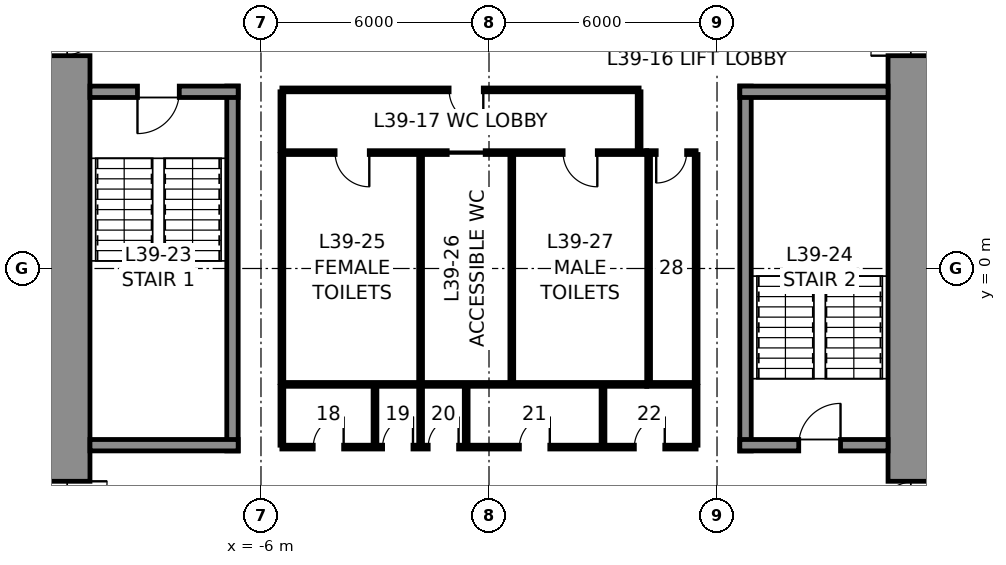
"""IFC4 building model, lengths in metres.
Left out: names, types, materials, properties, quantities, classifications, styles, units other than length and angle.
Written with IfcOpenShell. Run it as: python <this file> out.ifc"""

import sys

from ifc_helpers import new_model, si_unit, direction, frame, frame_2d, origin, place, context, subcontext, project, spatial, rectangle, extrude, element, fill, save


model = new_model("IFC4")
c1 = context("Model", 3, precision=1e-05, world=origin(), true_north=direction((0.0, 1.0)))
c2 = subcontext(c1, "Body", "Model", "MODEL_VIEW")
j1 = project(units=[si_unit("LENGTHUNIT", "METRE"), si_unit("PLANEANGLEUNIT", "RADIAN")], contexts=[c1])
p1 = place(None, origin())
s1 = spatial("IfcSite", under=j1, at=p1, CompositionType="ELEMENT")
p2 = place(p1, origin())
s2 = spatial("IfcBuilding", under=s1, at=p2, CompositionType="ELEMENT")
p3 = place(p2, frame((0.0, 0.0, 183.8)))
s3 = spatial("IfcBuildingStorey", under=s2, at=p3, CompositionType="ELEMENT", Elevation=183.8)
p4 = place(p3, frame((11.25, 10.5, 0.0), z_axis=(0.0, 0.0, 1.0), x_axis=(0.0, -1.0, 0.0)))
e1 = element("IfcWall", 1, at=p4, inside=s3, PredefinedType="SHEAR", context=c2, shape_type="SweptSolid", body=[
    extrude(rectangle(XDim=21.0, YDim=1.5, at=frame_2d((10.5, 0.0))), origin(), (0.0, 0.0, 1.0), 4.0),
])
p5 = place(p4, frame((3.7, 0.0, 0.0)))
e2 = element("IfcOpeningElement", 2, at=p5, cuts=e1, PredefinedType="OPENING", context=c2, shape_type="SweptSolid", body=[
    extrude(rectangle(XDim=1.2, YDim=2.3, at=frame_2d((0.6, 1.15))), frame((0.0, 0.76, 0.0), z_axis=(0.0, -1.0, 0.0), x_axis=(1.0, 0.0, 0.0)), (0.0, 0.0, 1.0), 1.52),
])
p6 = place(p4, frame((16.1, 0.0, 0.0)))
e3 = element("IfcOpeningElement", 3, at=p6, cuts=e1, PredefinedType="OPENING", context=c2, shape_type="SweptSolid", body=[
    extrude(rectangle(XDim=1.2, YDim=2.3, at=frame_2d((0.6, 1.15))), frame((0.0, 0.76, 0.0), z_axis=(0.0, -1.0, 0.0), x_axis=(1.0, 0.0, 0.0)), (0.0, 0.0, 1.0), 1.52),
])
p7 = place(p3, frame((-11.25, -10.5, 0.0), z_axis=(0.0, 0.0, 1.0), x_axis=(0.0, 1.0, 0.0)))
e4 = element("IfcWall", 4, at=p7, inside=s3, PredefinedType="SHEAR", context=c2, shape_type="SweptSolid", body=[
    extrude(rectangle(XDim=21.0, YDim=1.5, at=frame_2d((10.5, 0.0))), origin(), (0.0, 0.0, 1.0), 4.0),
])
p8 = place(p7, frame((16.1, 0.0, 0.0)))
e5 = element("IfcOpeningElement", 5, at=p8, cuts=e4, PredefinedType="OPENING", context=c2, shape_type="SweptSolid", body=[
    extrude(rectangle(XDim=1.2, YDim=2.3, at=frame_2d((0.6, 1.15))), frame((0.0, 0.76, 0.0), z_axis=(0.0, -1.0, 0.0), x_axis=(1.0, 0.0, 0.0)), (0.0, 0.0, 1.0), 1.52),
])
p9 = place(p7, frame((3.7, 0.0, 0.0)))
e6 = element("IfcOpeningElement", 6, at=p9, cuts=e4, PredefinedType="OPENING", context=c2, shape_type="SweptSolid", body=[
    extrude(rectangle(XDim=1.2, YDim=2.3, at=frame_2d((0.6, 1.15))), frame((0.0, 0.76, 0.0), z_axis=(0.0, -1.0, 0.0), x_axis=(1.0, 0.0, 0.0)), (0.0, 0.0, 1.0), 1.52),
])
p10 = place(p3, frame((-6.75, -4.8, 0.0), z_axis=(0.0, 0.0, 1.0), x_axis=(0.0, 1.0, 0.0)))
e7 = element("IfcWall", 7, at=p10, inside=s3, PredefinedType="SOLIDWALL", context=c2, shape_type="SweptSolid", body=[
    extrude(rectangle(XDim=9.6, YDim=0.3, at=frame_2d((4.8, 0.0))), origin(), (0.0, 0.0, 1.0), 3.75),
])
p11 = place(p3, frame((-10.5, 4.65, 0.0), z_axis=(0.0, 0.0, 1.0), x_axis=(1.0, 0.0, 0.0)))
e8 = element("IfcWall", 8, at=p11, inside=s3, PredefinedType="SOLIDWALL", context=c2, shape_type="SweptSolid", body=[
    extrude(rectangle(XDim=3.9, YDim=0.3, at=frame_2d((1.95, 0.0))), origin(), (0.0, 0.0, 1.0), 3.75),
])
p12 = place(p11, frame((1.25, 0.0, 0.0)))
e9 = element("IfcOpeningElement", 9, at=p12, cuts=e8, PredefinedType="OPENING", context=c2, shape_type="SweptSolid", body=[
    extrude(rectangle(XDim=1.1, YDim=2.3, at=frame_2d((0.55, 1.15))), frame((0.0, 0.16, 0.0), z_axis=(0.0, -1.0, 0.0), x_axis=(1.0, 0.0, 0.0)), (0.0, 0.0, 1.0), 0.32),
])
p13 = place(p3, frame((-6.6, -4.65, 0.0), z_axis=(0.0, 0.0, 1.0), x_axis=(-1.0, 0.0, 0.0)))
e10 = element("IfcWall", 10, at=p13, inside=s3, PredefinedType="SOLIDWALL", context=c2, shape_type="SweptSolid", body=[
    extrude(rectangle(XDim=3.9, YDim=0.3, at=frame_2d((1.95, 0.0))), origin(), (0.0, 0.0, 1.0), 3.75),
])
p14 = place(p3, frame((6.75, -4.8, 0.0), z_axis=(0.0, 0.0, 1.0), x_axis=(0.0, 1.0, 0.0)))
e11 = element("IfcWall", 11, at=p14, inside=s3, PredefinedType="SOLIDWALL", context=c2, shape_type="SweptSolid", body=[
    extrude(rectangle(XDim=9.6, YDim=0.3, at=frame_2d((4.8, 0.0))), origin(), (0.0, 0.0, 1.0), 3.75),
])
p15 = place(p3, frame((6.6, 4.65, 0.0), z_axis=(0.0, 0.0, 1.0), x_axis=(1.0, 0.0, 0.0)))
e12 = element("IfcWall", 12, at=p15, inside=s3, PredefinedType="SOLIDWALL", context=c2, shape_type="SweptSolid", body=[
    extrude(rectangle(XDim=3.9, YDim=0.3, at=frame_2d((1.95, 0.0))), origin(), (0.0, 0.0, 1.0), 3.75),
])
p16 = place(p3, frame((10.5, -4.65, 0.0), z_axis=(0.0, 0.0, 1.0), x_axis=(-1.0, 0.0, 0.0)))
e13 = element("IfcWall", 13, at=p16, inside=s3, PredefinedType="SOLIDWALL", context=c2, shape_type="SweptSolid", body=[
    extrude(rectangle(XDim=3.9, YDim=0.3, at=frame_2d((1.95, 0.0))), origin(), (0.0, 0.0, 1.0), 3.75),
])
p17 = place(p16, frame((1.25, 0.0, 0.0)))
e14 = element("IfcOpeningElement", 14, at=p17, cuts=e13, PredefinedType="OPENING", context=c2, shape_type="SweptSolid", body=[
    extrude(rectangle(XDim=1.1, YDim=2.3, at=frame_2d((0.55, 1.15))), frame((0.0, 0.16, 0.0), z_axis=(0.0, -1.0, 0.0), x_axis=(1.0, 0.0, 0.0)), (0.0, 0.0, 1.0), 0.32),
])
p18 = place(p3, frame((-5.45, 3.05, 0.0), z_axis=(0.0, 0.0, 1.0), x_axis=(1.0, 0.0, 0.0)))
e15 = element("IfcWall", 15, at=p18, inside=s3, PredefinedType="PARTITIONING", context=c2, shape_type="SweptSolid", body=[
    extrude(rectangle(XDim=9.6, YDim=0.1, at=frame_2d((4.8, 0.0))), origin(), (0.0, 0.0, 1.0), 3.75),
])
p19 = place(p18, frame((1.4, 0.0, 0.0)))
e16 = element("IfcOpeningElement", 16, at=p19, cuts=e15, PredefinedType="OPENING", context=c2, shape_type="SweptSolid", body=[
    extrude(rectangle(XDim=0.9, YDim=2.3, at=frame_2d((0.45, 1.15))), frame((0.0, 0.06, 0.0), z_axis=(0.0, -1.0, 0.0), x_axis=(1.0, 0.0, 0.0)), (0.0, 0.0, 1.0), 0.12),
])
p20 = place(p18, frame((4.35, 0.0, 0.0)))
e17 = element("IfcOpeningElement", 17, at=p20, cuts=e15, PredefinedType="OPENING", context=c2, shape_type="SweptSolid", body=[
    extrude(rectangle(XDim=1.0, YDim=2.3, at=frame_2d((0.5, 1.15))), frame((0.0, 0.06, 0.0), z_axis=(0.0, -1.0, 0.0), x_axis=(1.0, 0.0, 0.0)), (0.0, 0.0, 1.0), 0.12),
])
p21 = place(p18, frame((7.4, 0.0, 0.0)))
e18 = element("IfcOpeningElement", 18, at=p21, cuts=e15, PredefinedType="OPENING", context=c2, shape_type="SweptSolid", body=[
    extrude(rectangle(XDim=0.9, YDim=2.3, at=frame_2d((0.45, 1.15))), frame((0.0, 0.06, 0.0), z_axis=(0.0, -1.0, 0.0), x_axis=(1.0, 0.0, 0.0)), (0.0, 0.0, 1.0), 0.12),
])
p22 = place(p3, frame((4.15, 3.05, 0.0), z_axis=(0.0, 0.0, 1.0), x_axis=(1.0, 0.0, 0.0)))
e19 = element("IfcWall", 19, at=p22, inside=s3, PredefinedType="PARTITIONING", context=c2, shape_type="SweptSolid", body=[
    extrude(rectangle(XDim=1.3, YDim=0.1, at=frame_2d((0.65, 0.0))), origin(), (0.0, 0.0, 1.0), 3.75),
])
p23 = place(p22, frame((0.25, 0.0, 0.0)))
e20 = element("IfcOpeningElement", 20, at=p23, cuts=e19, PredefinedType="OPENING", context=c2, shape_type="SweptSolid", body=[
    extrude(rectangle(XDim=0.8, YDim=2.3, at=frame_2d((0.4, 1.15))), frame((0.0, 0.06, 0.0), z_axis=(0.0, -1.0, 0.0), x_axis=(1.0, 0.0, 0.0)), (0.0, 0.0, 1.0), 0.12),
])
p24 = place(p3, frame((4.15, -3.05, 0.0), z_axis=(0.0, 0.0, 1.0), x_axis=(-1.0, 0.0, 0.0)))
e21 = element("IfcWall", 21, at=p24, inside=s3, PredefinedType="PARTITIONING", context=c2, shape_type="SweptSolid", body=[
    extrude(rectangle(XDim=9.6, YDim=0.1, at=frame_2d((4.8, 0.0))), origin(), (0.0, 0.0, 1.0), 3.75),
])
p25 = place(p3, frame((5.45, -3.05, 0.0), z_axis=(0.0, 0.0, 1.0), x_axis=(-1.0, 0.0, 0.0)))
e22 = element("IfcWall", 22, at=p25, inside=s3, PredefinedType="PARTITIONING", context=c2, shape_type="SweptSolid", body=[
    extrude(rectangle(XDim=1.3, YDim=0.1, at=frame_2d((0.65, 0.0))), origin(), (0.0, 0.0, 1.0), 3.75),
])
for number, where, z_axis, x_axis in (
    (23, (5.45, 3.0, 0.0), (0.0, 0.0, 1.0), (0.0, -1.0, 0.0)),
    (24, (-5.45, -3.0, 0.0), (0.0, 0.0, 1.0), (0.0, 1.0, 0.0)),
    (25, (-1.8, -3.0, 0.0), (0.0, 0.0, 1.0), (0.0, 1.0, 0.0)),
    (26, (0.6, -3.0, 0.0), (0.0, 0.0, 1.0), (0.0, 1.0, 0.0)),
    (27, (4.2, -3.0, 0.0), (0.0, 0.0, 1.0), (0.0, 1.0, 0.0)),
):
    element("IfcWall", number, at=place(p3, frame(where, z_axis=z_axis, x_axis=x_axis)), inside=s3, PredefinedType="PARTITIONING", context=c2, shape_type="SweptSolid", body=[
        extrude(rectangle(XDim=6.0, YDim=0.1, at=frame_2d((3.0, 0.0))), origin(), (0.0, 0.0, 1.0), 3.75),
    ])
p26 = place(p3, frame((-5.45, 4.7, 0.0), z_axis=(0.0, 0.0, 1.0), x_axis=(1.0, 0.0, 0.0)))
e28 = element("IfcWall", 28, at=p26, inside=s3, PredefinedType="PARTITIONING", context=c2, shape_type="SweptSolid", body=[
    extrude(rectangle(XDim=9.4, YDim=0.1, at=frame_2d((4.7, 0.0))), origin(), (0.0, 0.0, 1.0), 3.75),
])
p27 = place(p26, frame((4.4, 0.0, 0.0)))
e29 = element("IfcOpeningElement", 29, at=p27, cuts=e28, PredefinedType="OPENING", context=c2, shape_type="SweptSolid", body=[
    extrude(rectangle(XDim=0.9, YDim=2.3, at=frame_2d((0.45, 1.15))), frame((0.0, 0.06, 0.0), z_axis=(0.0, -1.0, 0.0), x_axis=(1.0, 0.0, 0.0)), (0.0, 0.0, 1.0), 0.12),
])
for number, where, z_axis, x_axis in (
    (30, (-5.45, 3.1, 0.0), (0.0, 0.0, 1.0), (0.0, 1.0, 0.0)),
    (31, (3.95, 3.1, 0.0), (0.0, 0.0, 1.0), (0.0, 1.0, 0.0)),
):
    element("IfcWall", number, at=place(p3, frame(where, z_axis=z_axis, x_axis=x_axis)), inside=s3, PredefinedType="PARTITIONING", context=c2, shape_type="SweptSolid", body=[
        extrude(rectangle(XDim=1.55, YDim=0.1, at=frame_2d((0.775, 0.0))), origin(), (0.0, 0.0, 1.0), 3.75),
    ])
p28 = place(p3, frame((5.45, -4.7, 0.0), z_axis=(0.0, 0.0, 1.0), x_axis=(-1.0, 0.0, 0.0)))
e32 = element("IfcWall", 32, at=p28, inside=s3, PredefinedType="PARTITIONING", context=c2, shape_type="SweptSolid", body=[
    extrude(rectangle(XDim=10.9, YDim=0.1, at=frame_2d((5.45, 0.0))), origin(), (0.0, 0.0, 1.0), 3.75),
])
p29 = place(p28, frame((9.275, 0.0, 0.0)))
e33 = element("IfcOpeningElement", 33, at=p29, cuts=e32, PredefinedType="OPENING", context=c2, shape_type="SweptSolid", body=[
    extrude(rectangle(XDim=0.8, YDim=2.3, at=frame_2d((0.4, 1.15))), frame((0.0, 0.06, 0.0), z_axis=(0.0, -1.0, 0.0), x_axis=(1.0, 0.0, 0.0)), (0.0, 0.0, 1.0), 0.12),
])
p30 = place(p28, frame((7.45, 0.0, 0.0)))
e34 = element("IfcOpeningElement", 34, at=p30, cuts=e32, PredefinedType="OPENING", context=c2, shape_type="SweptSolid", body=[
    extrude(rectangle(XDim=0.8, YDim=2.3, at=frame_2d((0.4, 1.15))), frame((0.0, 0.06, 0.0), z_axis=(0.0, -1.0, 0.0), x_axis=(1.0, 0.0, 0.0)), (0.0, 0.0, 1.0), 0.12),
])
p31 = place(p28, frame((6.25, 0.0, 0.0)))
e35 = element("IfcOpeningElement", 35, at=p31, cuts=e32, PredefinedType="OPENING", context=c2, shape_type="SweptSolid", body=[
    extrude(rectangle(XDim=0.8, YDim=2.3, at=frame_2d((0.4, 1.15))), frame((0.0, 0.06, 0.0), z_axis=(0.0, -1.0, 0.0), x_axis=(1.0, 0.0, 0.0)), (0.0, 0.0, 1.0), 0.12),
])
p32 = place(p28, frame((3.85, 0.0, 0.0)))
e36 = element("IfcOpeningElement", 36, at=p32, cuts=e32, PredefinedType="OPENING", context=c2, shape_type="SweptSolid", body=[
    extrude(rectangle(XDim=0.8, YDim=2.3, at=frame_2d((0.4, 1.15))), frame((0.0, 0.06, 0.0), z_axis=(0.0, -1.0, 0.0), x_axis=(1.0, 0.0, 0.0)), (0.0, 0.0, 1.0), 0.12),
])
p33 = place(p28, frame((0.825, 0.0, 0.0)))
e37 = element("IfcOpeningElement", 37, at=p33, cuts=e32, PredefinedType="OPENING", context=c2, shape_type="SweptSolid", body=[
    extrude(rectangle(XDim=0.8, YDim=2.3, at=frame_2d((0.4, 1.15))), frame((0.0, 0.06, 0.0), z_axis=(0.0, -1.0, 0.0), x_axis=(1.0, 0.0, 0.0)), (0.0, 0.0, 1.0), 0.12),
])
for number, where, z_axis, x_axis in (
    (38, (-5.45, -3.1, 0.0), (0.0, 0.0, 1.0), (0.0, -1.0, 0.0)),
    (39, (5.45, -3.1, 0.0), (0.0, 0.0, 1.0), (0.0, -1.0, 0.0)),
    (40, (-3.0, -3.1, 0.0), (0.0, 0.0, 1.0), (0.0, -1.0, 0.0)),
    (41, (-1.8, -3.1, 0.0), (0.0, 0.0, 1.0), (0.0, -1.0, 0.0)),
    (42, (-0.6, -3.1, 0.0), (0.0, 0.0, 1.0), (0.0, -1.0, 0.0)),
    (43, (3.0, -3.1, 0.0), (0.0, 0.0, 1.0), (0.0, -1.0, 0.0)),
):
    element("IfcWall", number, at=place(p3, frame(where, z_axis=z_axis, x_axis=x_axis)), inside=s3, PredefinedType="PARTITIONING", context=c2, shape_type="SweptSolid", body=[
        extrude(rectangle(XDim=1.55, YDim=0.1, at=frame_2d((0.775, 0.0))), origin(), (0.0, 0.0, 1.0), 3.75),
    ])
p34 = place(p12, frame((1.1, 0.0, 0.0), z_axis=(0.0, 0.0, 1.0), x_axis=(-1.0, 0.0, 0.0)))
e44 = element("IfcDoor", 44, at=p34, inside=s3, OperationType="SINGLE_SWING_RIGHT", PredefinedType="DOOR", context=c2, shape_type="SweptSolid", body=[
    extrude(rectangle(XDim=1.1, YDim=2.3, at=frame_2d((0.55, 1.15))), frame((0.0, 0.025, 0.0), z_axis=(0.0, -1.0, 0.0), x_axis=(1.0, 0.0, 0.0)), (0.0, 0.0, 1.0), 0.05),
])
fill(e9, e44)
p35 = place(p17, frame((1.1, 0.0, 0.0), z_axis=(0.0, 0.0, 1.0), x_axis=(-1.0, 0.0, 0.0)))
e45 = element("IfcDoor", 45, at=p35, inside=s3, OperationType="SINGLE_SWING_RIGHT", PredefinedType="DOOR", context=c2, shape_type="SweptSolid", body=[
    extrude(rectangle(XDim=1.1, YDim=2.3, at=frame_2d((0.55, 1.15))), frame((0.0, 0.025, 0.0), z_axis=(0.0, -1.0, 0.0), x_axis=(1.0, 0.0, 0.0)), (0.0, 0.0, 1.0), 0.05),
])
fill(e14, e45)
p36 = place(p19, frame((0.9, 0.0, 0.0), z_axis=(0.0, 0.0, 1.0), x_axis=(-1.0, 0.0, 0.0)))
e46 = element("IfcDoor", 46, at=p36, inside=s3, OperationType="SINGLE_SWING_LEFT", PredefinedType="DOOR", context=c2, shape_type="SweptSolid", body=[
    extrude(rectangle(XDim=0.9, YDim=2.3, at=frame_2d((0.45, 1.15))), frame((0.0, 0.025, 0.0), z_axis=(0.0, -1.0, 0.0), x_axis=(1.0, 0.0, 0.0)), (0.0, 0.0, 1.0), 0.05),
])
fill(e16, e46)
p37 = place(p20, frame((1.0, 0.0, 0.0), z_axis=(0.0, 0.0, 1.0), x_axis=(-1.0, 0.0, 0.0)))
e47 = element("IfcDoor", 47, at=p37, inside=s3, OperationType="SLIDING_TO_LEFT", PredefinedType="DOOR", context=c2, shape_type="SweptSolid", body=[
    extrude(rectangle(XDim=1.0, YDim=2.3, at=frame_2d((0.5, 1.15))), frame((0.0, 0.025, 0.0), z_axis=(0.0, -1.0, 0.0), x_axis=(1.0, 0.0, 0.0)), (0.0, 0.0, 1.0), 0.05),
])
fill(e17, e47)
p38 = place(p21, frame((0.9, 0.0, 0.0), z_axis=(0.0, 0.0, 1.0), x_axis=(-1.0, 0.0, 0.0)))
e48 = element("IfcDoor", 48, at=p38, inside=s3, OperationType="SINGLE_SWING_LEFT", PredefinedType="DOOR", context=c2, shape_type="SweptSolid", body=[
    extrude(rectangle(XDim=0.9, YDim=2.3, at=frame_2d((0.45, 1.15))), frame((0.0, 0.025, 0.0), z_axis=(0.0, -1.0, 0.0), x_axis=(1.0, 0.0, 0.0)), (0.0, 0.0, 1.0), 0.05),
])
fill(e18, e48)
p39 = place(p23, frame((0.8, 0.0, 0.0), z_axis=(0.0, 0.0, 1.0), x_axis=(-1.0, 0.0, 0.0)))
e49 = element("IfcDoor", 49, at=p39, inside=s3, OperationType="SINGLE_SWING_RIGHT", PredefinedType="DOOR", context=c2, shape_type="SweptSolid", body=[
    extrude(rectangle(XDim=0.8, YDim=2.3, at=frame_2d((0.4, 1.15))), frame((0.0, 0.025, 0.0), z_axis=(0.0, -1.0, 0.0), x_axis=(1.0, 0.0, 0.0)), (0.0, 0.0, 1.0), 0.05),
])
fill(e20, e49)
p40 = place(p27, frame((0.9, 0.0, 0.0), z_axis=(0.0, 0.0, 1.0), x_axis=(-1.0, 0.0, 0.0)))
e50 = element("IfcDoor", 50, at=p40, inside=s3, OperationType="SINGLE_SWING_LEFT", PredefinedType="DOOR", context=c2, shape_type="SweptSolid", body=[
    extrude(rectangle(XDim=0.9, YDim=2.3, at=frame_2d((0.45, 1.15))), frame((0.0, 0.025, 0.0), z_axis=(0.0, -1.0, 0.0), x_axis=(1.0, 0.0, 0.0)), (0.0, 0.0, 1.0), 0.05),
])
fill(e29, e50)
p41 = place(p29, frame((0.8, 0.0, 0.0), z_axis=(0.0, 0.0, 1.0), x_axis=(-1.0, 0.0, 0.0)))
e51 = element("IfcDoor", 51, at=p41, inside=s3, OperationType="SINGLE_SWING_RIGHT", PredefinedType="DOOR", context=c2, shape_type="SweptSolid", body=[
    extrude(rectangle(XDim=0.8, YDim=2.3, at=frame_2d((0.4, 1.15))), frame((0.0, 0.025, 0.0), z_axis=(0.0, -1.0, 0.0), x_axis=(1.0, 0.0, 0.0)), (0.0, 0.0, 1.0), 0.05),
])
fill(e33, e51)
p42 = place(p30, frame((0.8, 0.0, 0.0), z_axis=(0.0, 0.0, 1.0), x_axis=(-1.0, 0.0, 0.0)))
e52 = element("IfcDoor", 52, at=p42, inside=s3, OperationType="SINGLE_SWING_RIGHT", PredefinedType="DOOR", context=c2, shape_type="SweptSolid", body=[
    extrude(rectangle(XDim=0.8, YDim=2.3, at=frame_2d((0.4, 1.15))), frame((0.0, 0.025, 0.0), z_axis=(0.0, -1.0, 0.0), x_axis=(1.0, 0.0, 0.0)), (0.0, 0.0, 1.0), 0.05),
])
fill(e34, e52)
p43 = place(p31, frame((0.8, 0.0, 0.0), z_axis=(0.0, 0.0, 1.0), x_axis=(-1.0, 0.0, 0.0)))
e53 = element("IfcDoor", 53, at=p43, inside=s3, OperationType="SINGLE_SWING_RIGHT", PredefinedType="DOOR", context=c2, shape_type="SweptSolid", body=[
    extrude(rectangle(XDim=0.8, YDim=2.3, at=frame_2d((0.4, 1.15))), frame((0.0, 0.025, 0.0), z_axis=(0.0, -1.0, 0.0), x_axis=(1.0, 0.0, 0.0)), (0.0, 0.0, 1.0), 0.05),
])
fill(e35, e53)
p44 = place(p32, frame((0.8, 0.0, 0.0), z_axis=(0.0, 0.0, 1.0), x_axis=(-1.0, 0.0, 0.0)))
e54 = element("IfcDoor", 54, at=p44, inside=s3, OperationType="SINGLE_SWING_RIGHT", PredefinedType="DOOR", context=c2, shape_type="SweptSolid", body=[
    extrude(rectangle(XDim=0.8, YDim=2.3, at=frame_2d((0.4, 1.15))), frame((0.0, 0.025, 0.0), z_axis=(0.0, -1.0, 0.0), x_axis=(1.0, 0.0, 0.0)), (0.0, 0.0, 1.0), 0.05),
])
fill(e36, e54)
p45 = place(p33, frame((0.8, 0.0, 0.0), z_axis=(0.0, 0.0, 1.0), x_axis=(-1.0, 0.0, 0.0)))
e55 = element("IfcDoor", 55, at=p45, inside=s3, OperationType="SINGLE_SWING_RIGHT", PredefinedType="DOOR", context=c2, shape_type="SweptSolid", body=[
    extrude(rectangle(XDim=0.8, YDim=2.3, at=frame_2d((0.4, 1.15))), frame((0.0, 0.025, 0.0), z_axis=(0.0, -1.0, 0.0), x_axis=(1.0, 0.0, 0.0)), (0.0, 0.0, 1.0), 0.05),
])
fill(e37, e55)
p46 = place(p8, frame((1.2, 0.0, 0.0), z_axis=(0.0, 0.0, 1.0), x_axis=(-1.0, 0.0, 0.0)))
e56 = element("IfcDoor", 56, at=p46, inside=s3, OperationType="SINGLE_SWING_LEFT", PredefinedType="DOOR", context=c2, shape_type="SweptSolid", body=[
    extrude(rectangle(XDim=1.2, YDim=2.3, at=frame_2d((0.6, 1.15))), frame((0.0, 0.025, 0.0), z_axis=(0.0, -1.0, 0.0), x_axis=(1.0, 0.0, 0.0)), (0.0, 0.0, 1.0), 0.05),
])
fill(e5, e56)
p47 = place(p9, frame((1.2, 0.0, 0.0), z_axis=(0.0, 0.0, 1.0), x_axis=(-1.0, 0.0, 0.0)))
e57 = element("IfcDoor", 57, at=p47, inside=s3, OperationType="SINGLE_SWING_LEFT", PredefinedType="DOOR", context=c2, shape_type="SweptSolid", body=[
    extrude(rectangle(XDim=1.2, YDim=2.3, at=frame_2d((0.6, 1.15))), frame((0.0, 0.025, 0.0), z_axis=(0.0, -1.0, 0.0), x_axis=(1.0, 0.0, 0.0)), (0.0, 0.0, 1.0), 0.05),
])
fill(e6, e57)
p48 = place(p5, frame((1.2, 0.0, 0.0), z_axis=(0.0, 0.0, 1.0), x_axis=(-1.0, 0.0, 0.0)))
e58 = element("IfcDoor", 58, at=p48, inside=s3, OperationType="SINGLE_SWING_LEFT", PredefinedType="DOOR", context=c2, shape_type="SweptSolid", body=[
    extrude(rectangle(XDim=1.2, YDim=2.3, at=frame_2d((0.6, 1.15))), frame((0.0, 0.025, 0.0), z_axis=(0.0, -1.0, 0.0), x_axis=(1.0, 0.0, 0.0)), (0.0, 0.0, 1.0), 0.05),
])
fill(e2, e58)
p49 = place(p6, frame((1.2, 0.0, 0.0), z_axis=(0.0, 0.0, 1.0), x_axis=(-1.0, 0.0, 0.0)))
e59 = element("IfcDoor", 59, at=p49, inside=s3, OperationType="SINGLE_SWING_LEFT", PredefinedType="DOOR", context=c2, shape_type="SweptSolid", body=[
    extrude(rectangle(XDim=1.2, YDim=2.3, at=frame_2d((0.6, 1.15))), frame((0.0, 0.025, 0.0), z_axis=(0.0, -1.0, 0.0), x_axis=(1.0, 0.0, 0.0)), (0.0, 0.0, 1.0), 0.05),
])
fill(e3, e59)
save(model, sys.argv[1])
